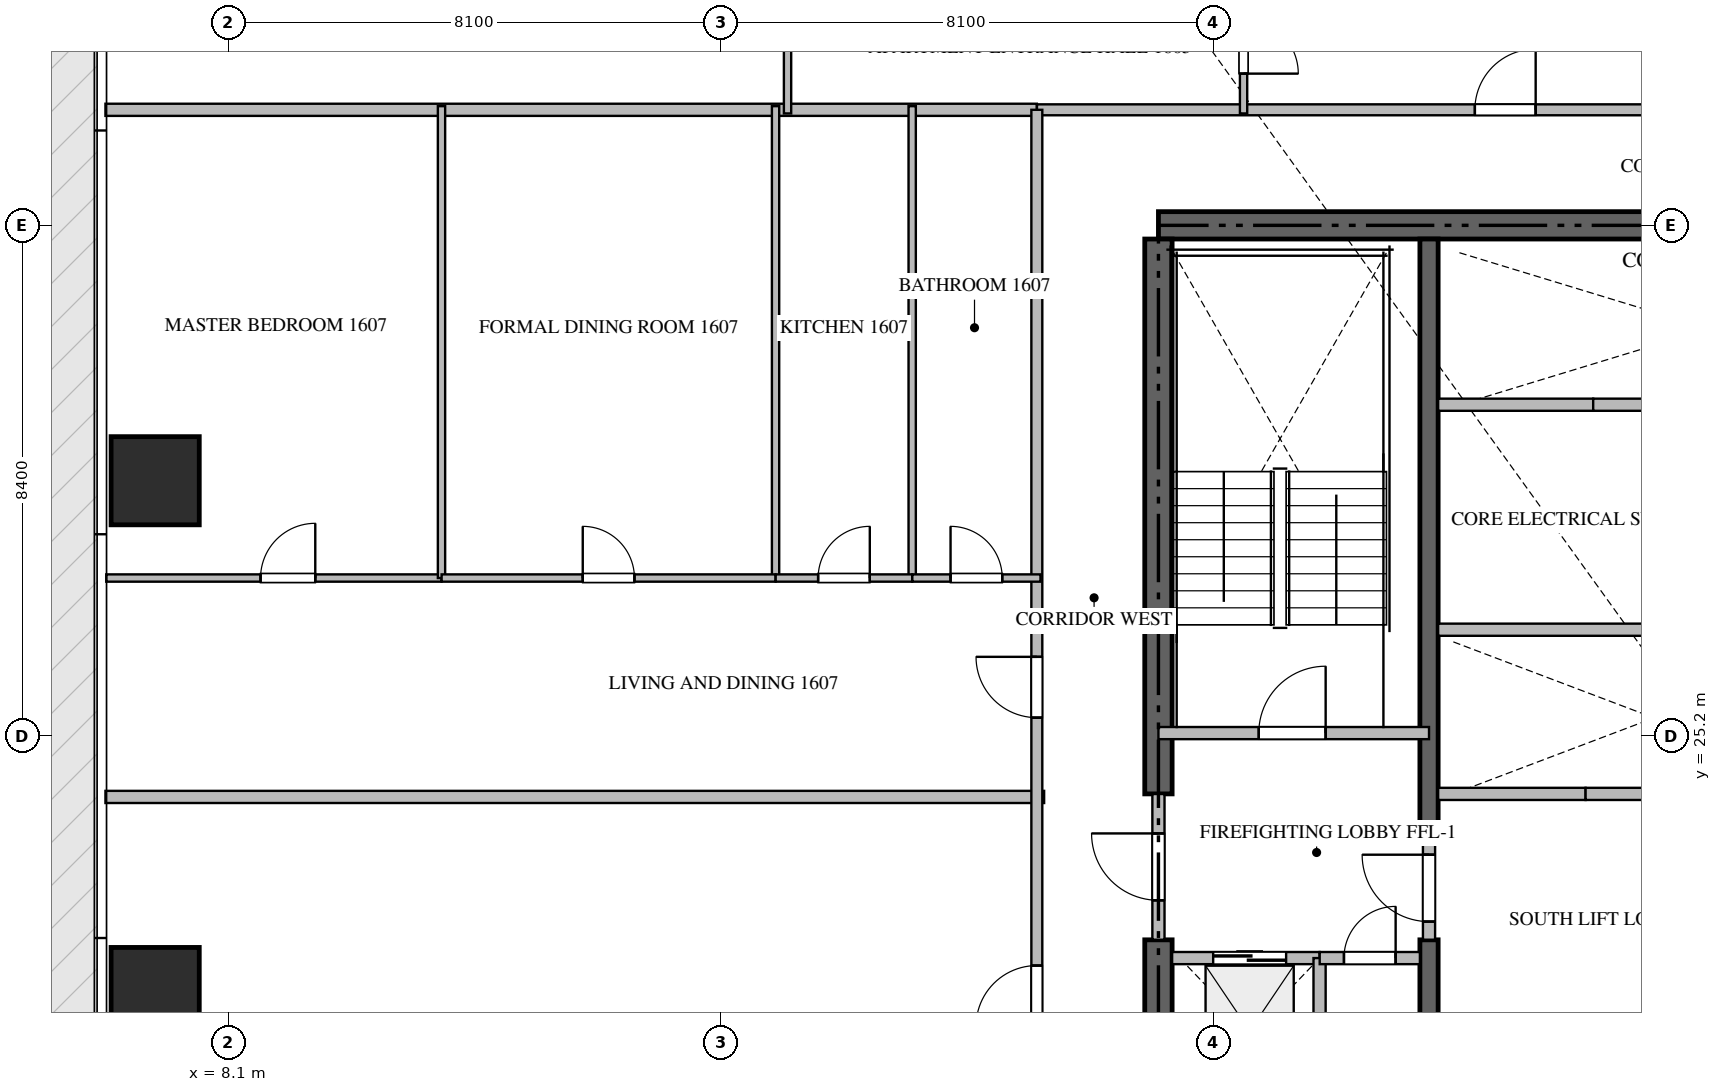
"""IFC4 building model, lengths in metres.
Left out: names, types, materials, properties, quantities, classifications, styles, units other than length and angle.
Written with IfcOpenShell. Run it as: python <this file> out.ifc"""

import sys

from ifc_helpers import new_model, si_unit, direction, frame, frame_2d, origin, origin_2d, place, context, subcontext, project, spatial, rectangle, extrude, source, transform, mapped, element, fill, save


model = new_model("IFC4")
c1 = context("Model", 3, precision=1e-05, world=origin(), true_north=direction((0.0, 1.0)))
c2 = subcontext(c1, "Body", "Model", "MODEL_VIEW")
j1 = project(units=[si_unit("LENGTHUNIT", "METRE"), si_unit("PLANEANGLEUNIT", "RADIAN")], contexts=[c1])
p1 = place(None, origin())
s1 = spatial("IfcSite", under=j1, at=p1, CompositionType="ELEMENT")
p2 = place(p1, origin())
s2 = spatial("IfcBuilding", under=s1, at=p2, CompositionType="ELEMENT")
p3 = place(p2, frame((0.0, 0.0, 67.95)))
s3 = spatial("IfcBuildingStorey", under=s2, at=p3, CompositionType="ELEMENT", Elevation=67.95)
p4 = place(p3, frame((41.4, 33.6, -0.26), z_axis=(0.0, 0.0, 1.0), x_axis=(-1.0, 0.0, 0.0)))
e1 = element("IfcWall", 1, at=p4, inside=s3, PredefinedType="SHEAR", context=c2, shape_type="SweptSolid", body=[
    extrude(rectangle(XDim=18.0, YDim=0.45, at=frame_2d((9.0, 0.0))), origin(), (0.0, 0.0, 1.0), 3.748),
])
p5 = place(p3, frame((23.4, 17.025, -0.26), z_axis=(0.0, 0.0, 1.0), x_axis=(0.0, 1.0, 0.0)))
e2 = element("IfcWall", 2, at=p5, inside=s3, PredefinedType="SHEAR", context=c2, shape_type="SweptSolid", body=[
    extrude(rectangle(XDim=4.825, YDim=0.45, at=frame_2d((2.413, 0.0))), origin(), (0.0, 0.0, 1.0), 3.748),
])
p6 = place(p3, frame((23.4, 24.25, -0.26), z_axis=(0.0, 0.0, 1.0), x_axis=(0.0, 1.0, 0.0)))
e3 = element("IfcWall", 3, at=p6, inside=s3, PredefinedType="SHEAR", context=c2, shape_type="SweptSolid", body=[
    extrude(rectangle(XDim=9.125, YDim=0.45, at=frame_2d((4.562, 0.0))), origin(), (0.0, 0.0, 1.0), 3.748),
])
p7 = place(p3, frame((27.85, 17.025, -0.26), z_axis=(0.0, 0.0, 1.0), x_axis=(0.0, 1.0, 0.0)))
e4 = element("IfcWall", 4, at=p7, inside=s3, PredefinedType="SHEAR", context=c2, shape_type="SweptSolid", body=[
    extrude(rectangle(XDim=4.825, YDim=0.3, at=frame_2d((2.413, 0.0))), origin(), (0.0, 0.0, 1.0), 3.748),
])
p8 = place(p3, frame((27.85, 23.55, -0.26), z_axis=(0.0, 0.0, 1.0), x_axis=(0.0, 1.0, 0.0)))
e5 = element("IfcWall", 5, at=p8, inside=s3, PredefinedType="SHEAR", context=c2, shape_type="SweptSolid", body=[
    extrude(rectangle(XDim=9.825, YDim=0.3, at=frame_2d((4.913, 0.0))), origin(), (0.0, 0.0, 1.0), 3.748),
])
m1 = source(origin(), c2, "Body", "SweptSolid", [
    extrude(rectangle(XDim=1.45, YDim=1.45, at=origin_2d()), origin(), (0.0, 0.0, 1.0), 3.75),
])
for number, where, z_axis, x_axis in (
    (6, (6.9, 21.0, -0.26), (0.0, 0.0, 1.0), (1.0, 0.0, 0.0)),
    (7, (6.9, 29.4, -0.26), (0.0, 0.0, 1.0), (1.0, 0.0, 0.0)),
):
    element("IfcColumn", number, at=place(p3, frame(where, z_axis=z_axis, x_axis=x_axis)), inside=s3, PredefinedType="COLUMN", context=c2, shape_type="MappedRepresentation", body=[
        mapped(m1, transform((0.0, 0.0, 0.0), scale=1.0)),
    ])
p9 = place(p3, frame((23.4, 25.25, 0.0), z_axis=(0.0, 0.0, 1.0), x_axis=(1.0, 0.0, 0.0)))
e8 = element("IfcWall", 8, at=p9, inside=s3, PredefinedType="STANDARD", context=c2, shape_type="SweptSolid", body=[
    extrude(rectangle(XDim=4.45, YDim=0.2, at=frame_2d((2.225, 0.0))), origin(), (0.0, 0.0, 1.0), 3.49),
])
p10 = place(p9, frame((1.65, 0.0, 0.0)))
e9 = element("IfcOpeningElement", 9, at=p10, cuts=e8, PredefinedType="OPENING", context=c2, shape_type="SweptSolid", body=[
    extrude(rectangle(XDim=1.1, YDim=2.15, at=frame_2d((0.55, 1.075))), frame((0.0, 0.11, 0.0), z_axis=(0.0, -1.0, 0.0), x_axis=(1.0, 0.0, 0.0)), (0.0, 0.0, 1.0), 0.22),
])
p11 = place(p3, frame((23.625, 21.55, 0.0), z_axis=(0.0, 0.0, 1.0), x_axis=(1.0, 0.0, 0.0)))
e10 = element("IfcWall", 10, at=p11, inside=s3, PredefinedType="STANDARD", context=c2, shape_type="SweptSolid", body=[
    extrude(rectangle(XDim=2.425, YDim=0.2, at=frame_2d((1.212, 0.0))), origin(), (0.0, 0.0, 1.0), 3.49),
])
p12 = place(p11, frame((0.675, 0.0, 0.0)))
e11 = element("IfcOpeningElement", 11, at=p12, cuts=e10, PredefinedType="OPENING", context=c2, shape_type="SweptSolid", body=[
    extrude(rectangle(XDim=1.2, YDim=2.2, at=frame_2d((0.6, 1.1))), frame((0.0, 0.11, 0.0), z_axis=(0.0, -1.0, 0.0), x_axis=(1.0, 0.0, 0.0)), (0.0, 0.0, 1.0), 0.22),
])
p13 = place(p3, frame((28.0, 24.25, 0.0), z_axis=(0.0, 0.0, 1.0), x_axis=(1.0, 0.0, 0.0)))
e12 = element("IfcWall", 12, at=p13, inside=s3, PredefinedType="STANDARD", context=c2, shape_type="SweptSolid", body=[
    extrude(rectangle(XDim=2.425, YDim=0.2, at=frame_2d((1.212, 0.0))), origin(), (0.0, 0.0, 1.0), 3.49),
])
p14 = place(p3, frame((30.425, 24.25, 0.0), z_axis=(0.0, 0.0, 1.0), x_axis=(1.0, 0.0, 0.0)))
e13 = element("IfcWall", 13, at=p14, inside=s3, PredefinedType="STANDARD", context=c2, shape_type="SweptSolid", body=[
    extrude(rectangle(XDim=2.25, YDim=0.2, at=frame_2d((1.125, 0.0))), origin(), (0.0, 0.0, 1.0), 3.49),
])
p15 = place(p3, frame((28.0, 30.65, 0.0), z_axis=(0.0, 0.0, 1.0), x_axis=(1.0, 0.0, 0.0)))
e14 = element("IfcWall", 14, at=p15, inside=s3, PredefinedType="STANDARD", context=c2, shape_type="SweptSolid", body=[
    extrude(rectangle(XDim=2.55, YDim=0.2, at=frame_2d((1.275, 0.0))), origin(), (0.0, 0.0, 1.0), 3.49),
])
p16 = place(p3, frame((30.55, 30.65, 0.0), z_axis=(0.0, 0.0, 1.0), x_axis=(1.0, 0.0, 0.0)))
e15 = element("IfcWall", 15, at=p16, inside=s3, PredefinedType="STANDARD", context=c2, shape_type="SweptSolid", body=[
    extrude(rectangle(XDim=2.3, YDim=0.2, at=frame_2d((1.15, 0.0))), origin(), (0.0, 0.0, 1.0), 3.49),
])
p17 = place(p3, frame((26.05, 19.05, 0.0), z_axis=(0.0, 0.0, 1.0), x_axis=(0.0, 1.0, 0.0)))
e16 = element("IfcWall", 16, at=p17, inside=s3, PredefinedType="STANDARD", context=c2, shape_type="SweptSolid", body=[
    extrude(rectangle(XDim=2.5, YDim=0.2, at=frame_2d((1.25, 0.0))), origin(), (0.0, 0.0, 1.0), 3.49),
])
p18 = place(p3, frame((26.052, 21.55, 0.0), z_axis=(0.0, 0.0, 1.0), x_axis=(1.0, 0.0, 0.0)))
e17 = element("IfcWall", 17, at=p18, inside=s3, PredefinedType="STANDARD", context=c2, shape_type="SweptSolid", body=[
    extrude(rectangle(XDim=1.648, YDim=0.2, at=frame_2d((0.824, 0.0))), origin(), (0.0, 0.0, 1.0), 3.49),
])
p19 = place(p18, frame((0.399, 0.0, 0.0)))
e18 = element("IfcOpeningElement", 18, at=p19, cuts=e17, PredefinedType="OPENING", context=c2, shape_type="SweptSolid", body=[
    extrude(rectangle(XDim=0.85, YDim=2.1, at=frame_2d((0.425, 1.05))), frame((0.0, 0.11, 0.0), z_axis=(0.0, -1.0, 0.0), x_axis=(1.0, 0.0, 0.0)), (0.0, 0.0, 1.0), 0.22),
])
p20 = place(p3, frame((23.4, 21.852, 0.0), z_axis=(0.0, 0.0, 1.0), x_axis=(0.0, 1.0, 0.0)))
e19 = element("IfcWall", 19, at=p20, inside=s3, PredefinedType="STANDARD", context=c2, shape_type="SweptSolid", body=[
    extrude(rectangle(XDim=2.396, YDim=0.2, at=frame_2d((1.198, 0.0))), origin(), (0.0, 0.0, 1.0), 3.49),
])
p21 = place(p20, frame((0.648, 0.0, 0.0)))
e20 = element("IfcOpeningElement", 20, at=p21, cuts=e19, PredefinedType="OPENING", context=c2, shape_type="SweptSolid", body=[
    extrude(rectangle(XDim=1.1, YDim=2.15, at=frame_2d((0.55, 1.075))), frame((0.0, 0.11, 0.0), z_axis=(0.0, -1.0, 0.0), x_axis=(1.0, 0.0, 0.0)), (0.0, 0.0, 1.0), 0.22),
])
p22 = place(p3, frame((27.85, 21.852, 0.0), z_axis=(0.0, 0.0, 1.0), x_axis=(0.0, 1.0, 0.0)))
e21 = element("IfcWall", 21, at=p22, inside=s3, PredefinedType="STANDARD", context=c2, shape_type="SweptSolid", body=[
    extrude(rectangle(XDim=1.696, YDim=0.2, at=frame_2d((0.848, 0.0))), origin(), (0.0, 0.0, 1.0), 3.49),
])
p23 = place(p22, frame((0.298, 0.0, 0.0)))
e22 = element("IfcOpeningElement", 22, at=p23, cuts=e21, PredefinedType="OPENING", context=c2, shape_type="SweptSolid", body=[
    extrude(rectangle(XDim=1.1, YDim=2.15, at=frame_2d((0.55, 1.075))), frame((0.0, 0.11, 0.0), z_axis=(0.0, -1.0, 0.0), x_axis=(1.0, 0.0, 0.0)), (0.0, 0.0, 1.0), 0.22),
])
p24 = place(p3, frame((28.0, 26.95, 0.0), z_axis=(0.0, 0.0, 1.0), x_axis=(1.0, 0.0, 0.0)))
e23 = element("IfcWall", 23, at=p24, inside=s3, PredefinedType="STANDARD", context=c2, shape_type="SweptSolid", body=[
    extrude(rectangle(XDim=6.95, YDim=0.2, at=frame_2d((3.475, 0.0))), origin(), (0.0, 0.0, 1.0), 3.49),
])
p25 = place(p3, frame((6.082, 24.2, 0.0), z_axis=(0.0, 0.0, 1.0), x_axis=(1.0, 0.0, 0.0)))
e24 = element("IfcWall", 24, at=p25, inside=s3, PredefinedType="PARTITIONING", context=c2, shape_type="SweptSolid", body=[
    extrude(rectangle(XDim=15.438, YDim=0.2, at=frame_2d((7.719, 0.0))), origin(), (0.0, 0.0, 1.0), 3.49),
])
p26 = place(p3, frame((6.082, 35.5, 0.0), z_axis=(0.0, 0.0, 1.0), x_axis=(1.0, 0.0, 0.0)))
e25 = element("IfcWall", 25, at=p26, inside=s3, PredefinedType="PARTITIONING", context=c2, shape_type="SweptSolid", body=[
    extrude(rectangle(XDim=15.318, YDim=0.2, at=frame_2d((7.659, 0.0))), origin(), (0.0, 0.0, 1.0), 3.49),
])
p27 = place(p3, frame((21.402, 35.5, 0.0), z_axis=(0.0, 0.0, 1.0), x_axis=(1.0, 0.0, 0.0)))
e26 = element("IfcWall", 26, at=p27, inside=s3, PredefinedType="PARTITIONING", context=c2, shape_type="SweptSolid", body=[
    extrude(rectangle(XDim=21.996, YDim=0.18, at=frame_2d((10.998, 0.0))), origin(), (0.0, 0.0, 1.0), 3.49),
])
p28 = place(p27, frame((7.202, 0.0, 0.0)))
e27 = element("IfcOpeningElement", 27, at=p28, cuts=e26, PredefinedType="OPENING", context=c2, shape_type="SweptSolid", body=[
    extrude(rectangle(XDim=1.0, YDim=2.15, at=frame_2d((0.5, 1.075))), frame((0.0, 0.1, 0.0), z_axis=(0.0, -1.0, 0.0), x_axis=(1.0, 0.0, 0.0)), (0.0, 0.0, 1.0), 0.2),
])
p29 = place(p3, frame((21.4, 14.9, 0.0), z_axis=(0.0, 0.0, 1.0), x_axis=(0.0, 1.0, 0.0)))
e28 = element("IfcWall", 28, at=p29, inside=s3, PredefinedType="PARTITIONING", context=c2, shape_type="SweptSolid", body=[
    extrude(rectangle(XDim=20.6, YDim=0.18, at=frame_2d((10.3, 0.0))), origin(), (0.0, 0.0, 1.0), 3.49),
])
p30 = place(p29, frame((5.527, 0.0, 0.0)))
e29 = element("IfcOpeningElement", 29, at=p30, cuts=e28, PredefinedType="OPENING", context=c2, shape_type="SweptSolid", body=[
    extrude(rectangle(XDim=1.0, YDim=2.15, at=frame_2d((0.5, 1.075))), frame((0.0, 0.1, 0.0), z_axis=(0.0, -1.0, 0.0), x_axis=(1.0, 0.0, 0.0)), (0.0, 0.0, 1.0), 0.2),
])
p31 = place(p29, frame((10.604, 0.0, 0.0)))
e30 = element("IfcOpeningElement", 30, at=p31, cuts=e28, PredefinedType="OPENING", context=c2, shape_type="SweptSolid", body=[
    extrude(rectangle(XDim=1.0, YDim=2.15, at=frame_2d((0.5, 1.075))), frame((0.0, 0.1, 0.0), z_axis=(0.0, -1.0, 0.0), x_axis=(1.0, 0.0, 0.0)), (0.0, 0.0, 1.0), 0.2),
])
p32 = place(p3, frame((24.8, 37.65, 0.0), z_axis=(0.0, 0.0, 1.0), x_axis=(0.0, -1.0, 0.0)))
e31 = element("IfcWall", 31, at=p32, inside=s3, PredefinedType="PARTITIONING", context=c2, shape_type="SweptSolid", body=[
    extrude(rectangle(XDim=2.21, YDim=0.12, at=frame_2d((1.105, 0.0))), origin(), (0.0, 0.0, 1.0), 3.49),
])
p33 = place(p32, frame((0.655, 0.0, 0.0)))
e32 = element("IfcOpeningElement", 32, at=p33, cuts=e31, PredefinedType="OPENING", context=c2, shape_type="SweptSolid", body=[
    extrude(rectangle(XDim=0.9, YDim=2.1, at=frame_2d((0.45, 1.05))), frame((0.0, 0.07, 0.0), z_axis=(0.0, -1.0, 0.0), x_axis=(1.0, 0.0, 0.0)), (0.0, 0.0, 1.0), 0.14),
])
p34 = place(p3, frame((17.3, 37.648, 0.0), z_axis=(0.0, 0.0, 1.0), x_axis=(0.0, -1.0, 0.0)))
e33 = element("IfcWall", 33, at=p34, inside=s3, PredefinedType="PARTITIONING", context=c2, shape_type="SweptSolid", body=[
    extrude(rectangle(XDim=2.208, YDim=0.12, at=frame_2d((1.104, 0.0))), origin(), (0.0, 0.0, 1.0), 3.49),
])
p35 = place(p3, frame((6.095, 27.8, 0.0), z_axis=(0.0, 0.0, 1.0), x_axis=(1.0, 0.0, 0.0)))
e34 = element("IfcWall", 34, at=p35, inside=s3, PredefinedType="PARTITIONING", context=c2, shape_type="SweptSolid", body=[
    extrude(rectangle(XDim=5.514, YDim=0.12, at=frame_2d((2.757, 0.0))), origin(), (0.0, 0.0, 1.0), 3.49),
])
p36 = place(p35, frame((2.538, 0.0, 0.0)))
e35 = element("IfcOpeningElement", 35, at=p36, cuts=e34, PredefinedType="OPENING", context=c2, shape_type="SweptSolid", body=[
    extrude(rectangle(XDim=0.9, YDim=2.1, at=frame_2d((0.45, 1.05))), frame((0.0, 0.07, 0.0), z_axis=(0.0, -1.0, 0.0), x_axis=(1.0, 0.0, 0.0)), (0.0, 0.0, 1.0), 0.14),
])
for number, where, z_axis, x_axis in (
    (36, (11.609, 27.8, 0.0), (0.0, 0.0, 1.0), (0.0, 1.0, 0.0)),
    (37, (17.103, 27.8, 0.0), (0.0, 0.0, 1.0), (0.0, 1.0, 0.0)),
    (38, (19.35, 27.8, 0.0), (0.0, 0.0, 1.0), (0.0, 1.0, 0.0)),
):
    element("IfcWall", number, at=place(p3, frame(where, z_axis=z_axis, x_axis=x_axis)), inside=s3, PredefinedType="PARTITIONING", context=c2, shape_type="SweptSolid", body=[
        extrude(rectangle(XDim=7.76, YDim=0.12, at=frame_2d((3.88, 0.0))), origin(), (0.0, 0.0, 1.0), 3.49),
    ])
p37 = place(p3, frame((11.611, 27.8, 0.0), z_axis=(0.0, 0.0, 1.0), x_axis=(1.0, 0.0, 0.0)))
e39 = element("IfcWall", 39, at=p37, inside=s3, PredefinedType="PARTITIONING", context=c2, shape_type="SweptSolid", body=[
    extrude(rectangle(XDim=5.492, YDim=0.12, at=frame_2d((2.746, 0.0))), origin(), (0.0, 0.0, 1.0), 3.49),
])
p38 = place(p37, frame((2.321, 0.0, 0.0)))
e40 = element("IfcOpeningElement", 40, at=p38, cuts=e39, PredefinedType="OPENING", context=c2, shape_type="SweptSolid", body=[
    extrude(rectangle(XDim=0.85, YDim=2.1, at=frame_2d((0.425, 1.05))), frame((0.0, 0.07, 0.0), z_axis=(0.0, -1.0, 0.0), x_axis=(1.0, 0.0, 0.0)), (0.0, 0.0, 1.0), 0.14),
])
p39 = place(p3, frame((17.105, 27.8, 0.0), z_axis=(0.0, 0.0, 1.0), x_axis=(1.0, 0.0, 0.0)))
e41 = element("IfcWall", 41, at=p39, inside=s3, PredefinedType="PARTITIONING", context=c2, shape_type="SweptSolid", body=[
    extrude(rectangle(XDim=2.245, YDim=0.12, at=frame_2d((1.123, 0.0))), origin(), (0.0, 0.0, 1.0), 3.49),
])
p40 = place(p39, frame((0.698, 0.0, 0.0)))
e42 = element("IfcOpeningElement", 42, at=p40, cuts=e41, PredefinedType="OPENING", context=c2, shape_type="SweptSolid", body=[
    extrude(rectangle(XDim=0.85, YDim=2.1, at=frame_2d((0.425, 1.05))), frame((0.0, 0.07, 0.0), z_axis=(0.0, -1.0, 0.0), x_axis=(1.0, 0.0, 0.0)), (0.0, 0.0, 1.0), 0.14),
])
p41 = place(p3, frame((19.352, 27.8, 0.0), z_axis=(0.0, 0.0, 1.0), x_axis=(1.0, 0.0, 0.0)))
e43 = element("IfcWall", 43, at=p41, inside=s3, PredefinedType="PARTITIONING", context=c2, shape_type="SweptSolid", body=[
    extrude(rectangle(XDim=2.108, YDim=0.12, at=frame_2d((1.054, 0.0))), origin(), (0.0, 0.0, 1.0), 3.49),
])
p42 = place(p41, frame((0.629, 0.0, 0.0)))
e44 = element("IfcOpeningElement", 44, at=p42, cuts=e43, PredefinedType="OPENING", context=c2, shape_type="SweptSolid", body=[
    extrude(rectangle(XDim=0.85, YDim=2.1, at=frame_2d((0.425, 1.05))), frame((0.0, 0.07, 0.0), z_axis=(0.0, -1.0, 0.0), x_axis=(1.0, 0.0, 0.0)), (0.0, 0.0, 1.0), 0.14),
])
m2 = source(origin(), c2, "Body", "SweptSolid", [
    extrude(rectangle(XDim=1.1, YDim=2.15, at=frame_2d((0.55, 1.075))), frame((0.0, 0.025, 0.0), z_axis=(0.0, -1.0, 0.0), x_axis=(1.0, 0.0, 0.0)), (0.0, 0.0, 1.0), 0.05),
])
p43 = place(p10, origin())
e45 = element("IfcDoor", 45, at=p43, inside=s3, OperationType="SINGLE_SWING_RIGHT", PredefinedType="DOOR", context=c2, shape_type="MappedRepresentation", body=[
    mapped(m2, transform((0.0, 0.0, 0.0), scale=1.0)),
])
fill(e9, e45)
m3 = source(origin(), c2, "Body", "SweptSolid", [
    extrude(rectangle(XDim=1.2, YDim=2.2, at=frame_2d((0.6, 1.1))), frame((0.0, 0.025, 0.0), z_axis=(0.0, -1.0, 0.0), x_axis=(1.0, 0.0, 0.0)), (0.0, 0.0, 1.0), 0.05),
])
p44 = place(p12, origin())
e46 = element("IfcDoor", 46, at=p44, inside=s3, OperationType="DOUBLE_DOOR_SLIDING", PredefinedType="DOOR", context=c2, shape_type="MappedRepresentation", body=[
    mapped(m3, transform((0.0, 0.0, 0.0), scale=1.0)),
])
fill(e11, e46)
m4 = source(origin(), c2, "Body", "SweptSolid", [
    extrude(rectangle(XDim=0.85, YDim=2.1, at=frame_2d((0.425, 1.05))), frame((0.0, 0.025, 0.0), z_axis=(0.0, -1.0, 0.0), x_axis=(1.0, 0.0, 0.0)), (0.0, 0.0, 1.0), 0.05),
])
p45 = place(p19, origin())
e47 = element("IfcDoor", 47, at=p45, inside=s3, OperationType="SINGLE_SWING_RIGHT", PredefinedType="DOOR", context=c2, shape_type="MappedRepresentation", body=[
    mapped(m4, transform((0.0, 0.0, 0.0), scale=1.0)),
])
fill(e18, e47)
p46 = place(p21, origin())
e48 = element("IfcDoor", 48, at=p46, inside=s3, OperationType="SINGLE_SWING_RIGHT", PredefinedType="DOOR", context=c2, shape_type="MappedRepresentation", body=[
    mapped(m2, transform((0.0, 0.0, 0.0), scale=1.0)),
])
fill(e20, e48)
p47 = place(p23, origin())
e49 = element("IfcDoor", 49, at=p47, inside=s3, OperationType="SINGLE_SWING_RIGHT", PredefinedType="DOOR", context=c2, shape_type="MappedRepresentation", body=[
    mapped(m2, transform((0.0, 0.0, 0.0), scale=1.0)),
])
fill(e22, e49)
m5 = source(origin(), c2, "Body", "SweptSolid", [
    extrude(rectangle(XDim=1.0, YDim=2.15, at=frame_2d((0.5, 1.075))), frame((0.0, 0.025, 0.0), z_axis=(0.0, -1.0, 0.0), x_axis=(1.0, 0.0, 0.0)), (0.0, 0.0, 1.0), 0.05),
])
p48 = place(p28, origin())
e50 = element("IfcDoor", 50, at=p48, inside=s3, OperationType="SINGLE_SWING_RIGHT", PredefinedType="DOOR", context=c2, shape_type="MappedRepresentation", body=[
    mapped(m5, transform((0.0, 0.0, 0.0), scale=1.0)),
])
fill(e27, e50)
p49 = place(p30, origin())
e51 = element("IfcDoor", 51, at=p49, inside=s3, OperationType="SINGLE_SWING_LEFT", PredefinedType="DOOR", context=c2, shape_type="MappedRepresentation", body=[
    mapped(m5, transform((0.0, 0.0, 0.0), scale=1.0)),
])
fill(e29, e51)
p50 = place(p31, origin())
e52 = element("IfcDoor", 52, at=p50, inside=s3, OperationType="SINGLE_SWING_RIGHT", PredefinedType="DOOR", context=c2, shape_type="MappedRepresentation", body=[
    mapped(m5, transform((0.0, 0.0, 0.0), scale=1.0)),
])
fill(e30, e52)
m6 = source(origin(), c2, "Body", "SweptSolid", [
    extrude(rectangle(XDim=0.9, YDim=2.1, at=frame_2d((0.45, 1.05))), frame((0.0, 0.025, 0.0), z_axis=(0.0, -1.0, 0.0), x_axis=(1.0, 0.0, 0.0)), (0.0, 0.0, 1.0), 0.05),
])
p51 = place(p33, origin())
e53 = element("IfcDoor", 53, at=p51, inside=s3, OperationType="SINGLE_SWING_RIGHT", PredefinedType="DOOR", context=c2, shape_type="MappedRepresentation", body=[
    mapped(m6, transform((0.0, 0.0, 0.0), scale=1.0)),
])
fill(e32, e53)
p52 = place(p36, origin())
e54 = element("IfcDoor", 54, at=p52, inside=s3, OperationType="SINGLE_SWING_RIGHT", PredefinedType="DOOR", context=c2, shape_type="MappedRepresentation", body=[
    mapped(m6, transform((0.0, 0.0, 0.0), scale=1.0)),
])
fill(e35, e54)
p53 = place(p38, origin())
e55 = element("IfcDoor", 55, at=p53, inside=s3, OperationType="SINGLE_SWING_LEFT", PredefinedType="DOOR", context=c2, shape_type="MappedRepresentation", body=[
    mapped(m4, transform((0.0, 0.0, 0.0), scale=1.0)),
])
fill(e40, e55)
p54 = place(p40, origin())
e56 = element("IfcDoor", 56, at=p54, inside=s3, OperationType="SINGLE_SWING_RIGHT", PredefinedType="DOOR", context=c2, shape_type="MappedRepresentation", body=[
    mapped(m4, transform((0.0, 0.0, 0.0), scale=1.0)),
])
fill(e42, e56)
p55 = place(p42, origin())
e57 = element("IfcDoor", 57, at=p55, inside=s3, OperationType="SINGLE_SWING_LEFT", PredefinedType="DOOR", context=c2, shape_type="MappedRepresentation", body=[
    mapped(m4, transform((0.0, 0.0, 0.0), scale=1.0)),
])
fill(e44, e57)
save(model, sys.argv[1])
